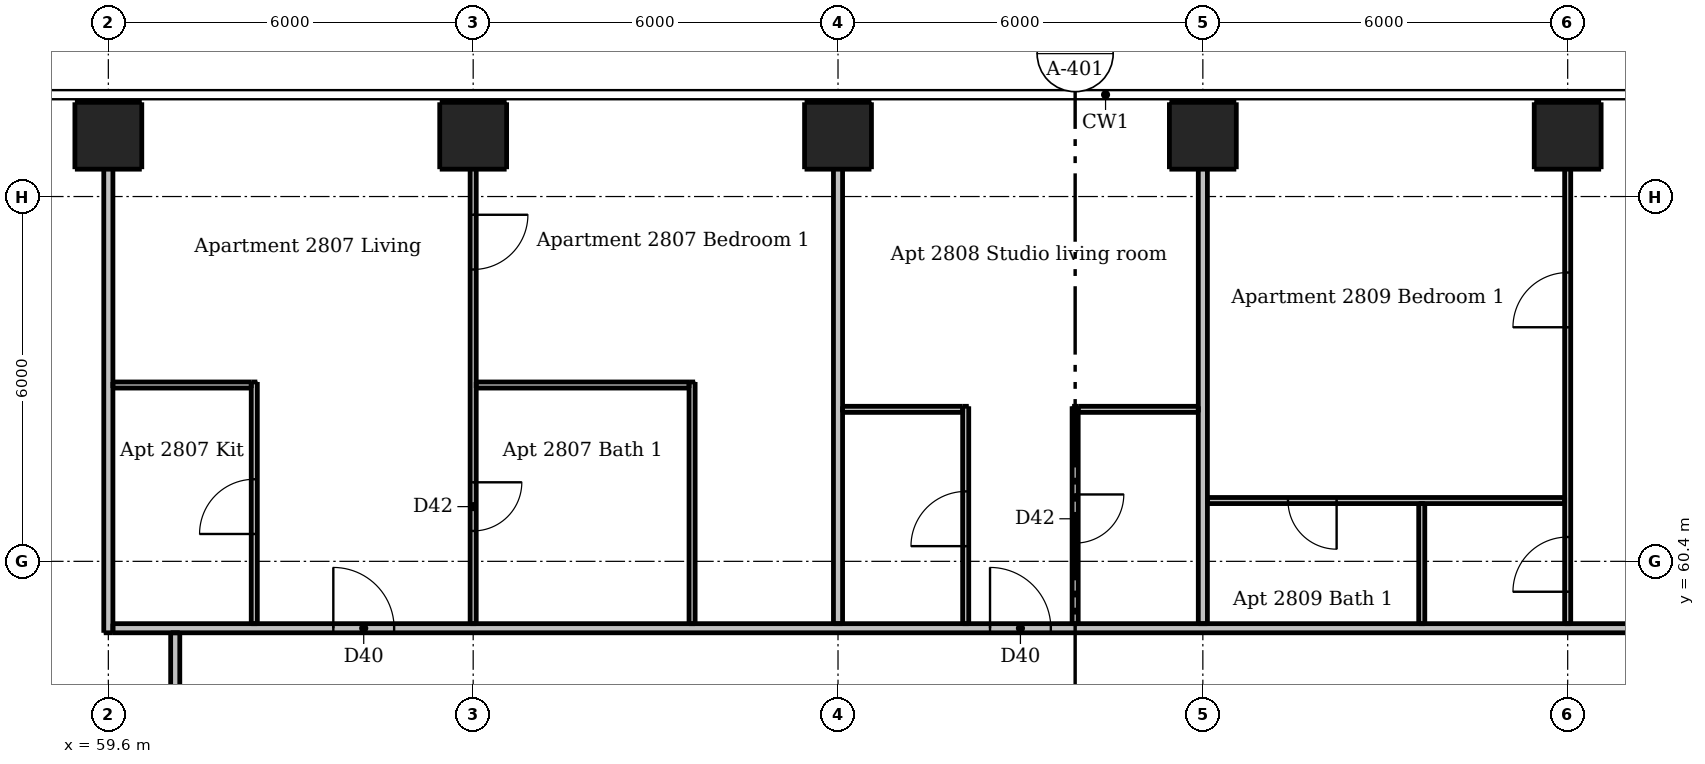
"""IFC4 building model, lengths in metres.
Left out: names, types, materials, properties, quantities, classifications, styles, units other than length and angle.
Written with IfcOpenShell. Run it as: python <this file> out.ifc"""

import sys

from ifc_helpers import new_model, si_unit, direction, frame, frame_2d, origin, origin_2d, place, context, subcontext, project, spatial, rectangle, extrude, element, fill, save


model = new_model("IFC4")
c1 = context("Model", 3, precision=1e-05, world=origin(), true_north=direction((0.0, 1.0)))
c2 = subcontext(c1, "Body", "Model", "MODEL_VIEW")
j1 = project(units=[si_unit("LENGTHUNIT", "METRE"), si_unit("PLANEANGLEUNIT", "RADIAN")], contexts=[c1])
p1 = place(None, origin())
s1 = spatial("IfcSite", under=j1, at=p1, CompositionType="ELEMENT")
p2 = place(p1, origin())
s2 = spatial("IfcBuilding", under=s1, at=p2, CompositionType="ELEMENT")
p3 = place(p2, frame((0.0, 0.0, 105.1)))
s3 = spatial("IfcBuildingStorey", under=s2, at=p3, CompositionType="ELEMENT", Elevation=105.1)
for number, where, z_axis, x_axis in (
    (1, (59.6, 67.4, 0.0), (0.0, 0.0, 1.0), (1.0, 0.0, 0.0)),
    (2, (65.6, 67.4, 0.0), (0.0, 0.0, 1.0), (1.0, 0.0, 0.0)),
    (3, (71.6, 67.4, 0.0), (0.0, 0.0, 1.0), (1.0, 0.0, 0.0)),
    (4, (77.6, 67.4, 0.0), (0.0, 0.0, 1.0), (1.0, 0.0, 0.0)),
    (5, (83.6, 67.4, 0.0), (0.0, 0.0, 1.0), (1.0, 0.0, 0.0)),
):
    element("IfcColumn", number, at=place(p3, frame(where, z_axis=z_axis, x_axis=x_axis)), inside=s3, PredefinedType="COLUMN", context=c2, shape_type="SweptSolid", body=[
        extrude(rectangle(XDim=1.1, YDim=1.1, at=origin_2d()), origin(), (0.0, 0.0, 1.0), 3.05),
    ])
p4 = place(p3, frame((62.0, 59.375, 0.0), z_axis=(0.0, 0.0, 1.0), x_axis=(0.0, 1.0, 0.0)))
e6 = element("IfcWall", 6, at=p4, inside=s3, PredefinedType="PARTITIONING", context=c2, shape_type="SweptSolid", body=[
    extrude(rectangle(XDim=3.975, YDim=0.1, at=frame_2d((1.988, 0.0))), origin(), (0.0, 0.0, 1.0), 3.05),
])
p5 = place(p4, frame((1.475, 0.0, 0.0)))
e7 = element("IfcOpeningElement", 7, at=p5, cuts=e6, PredefinedType="OPENING", context=c2, shape_type="SweptSolid", body=[
    extrude(rectangle(XDim=0.9, YDim=2.1, at=frame_2d((0.45, 1.05))), frame((0.0, 0.06, 0.0), z_axis=(0.0, -1.0, 0.0), x_axis=(1.0, 0.0, 0.0)), (0.0, 0.0, 1.0), 0.12),
])
p6 = place(p3, frame((65.6, 68.0, 0.0), z_axis=(0.0, 0.0, 1.0), x_axis=(0.0, -1.0, 0.0)))
e8 = element("IfcWall", 8, at=p6, inside=s3, PredefinedType="PARTITIONING", context=c2, shape_type="SweptSolid", body=[
    extrude(rectangle(XDim=8.625, YDim=0.1, at=frame_2d((4.312, 0.0))), origin(), (0.0, 0.0, 1.0), 2.516),
])
p7 = place(p6, frame((1.9, 0.0, 0.0)))
e9 = element("IfcOpeningElement", 9, at=p7, cuts=e8, PredefinedType="OPENING", context=c2, shape_type="SweptSolid", body=[
    extrude(rectangle(XDim=0.9, YDim=2.1, at=frame_2d((0.45, 1.05))), frame((0.0, 0.06, 0.0), z_axis=(0.0, -1.0, 0.0), x_axis=(1.0, 0.0, 0.0)), (0.0, 0.0, 1.0), 0.12),
])
p8 = place(p6, frame((6.3, 0.0, 0.0)))
e10 = element("IfcOpeningElement", 10, at=p8, cuts=e8, PredefinedType="OPENING", context=c2, shape_type="SweptSolid", body=[
    extrude(rectangle(XDim=0.8, YDim=2.1, at=frame_2d((0.4, 1.05))), frame((0.0, 0.06, 0.0), z_axis=(0.0, -1.0, 0.0), x_axis=(1.0, 0.0, 0.0)), (0.0, 0.0, 1.0), 0.12),
])
p9 = place(p3, frame((69.2, 59.375, 0.0), z_axis=(0.0, 0.0, 1.0), x_axis=(0.0, 1.0, 0.0)))
e11 = element("IfcWall", 11, at=p9, inside=s3, PredefinedType="PARTITIONING", context=c2, shape_type="SweptSolid", body=[
    extrude(rectangle(XDim=3.975, YDim=0.1, at=frame_2d((1.988, 0.0))), origin(), (0.0, 0.0, 1.0), 3.05),
])
p10 = place(p3, frame((73.7, 59.375, 0.0), z_axis=(0.0, 0.0, 1.0), x_axis=(0.0, 1.0, 0.0)))
e12 = element("IfcWall", 12, at=p10, inside=s3, PredefinedType="PARTITIONING", context=c2, shape_type="SweptSolid", body=[
    extrude(rectangle(XDim=3.575, YDim=0.1, at=frame_2d((1.788, 0.0))), origin(), (0.0, 0.0, 1.0), 3.05),
])
p11 = place(p10, frame((1.275, 0.0, 0.0)))
e13 = element("IfcOpeningElement", 13, at=p11, cuts=e12, PredefinedType="OPENING", context=c2, shape_type="SweptSolid", body=[
    extrude(rectangle(XDim=0.9, YDim=2.1, at=frame_2d((0.45, 1.05))), frame((0.0, 0.06, 0.0), z_axis=(0.0, -1.0, 0.0), x_axis=(1.0, 0.0, 0.0)), (0.0, 0.0, 1.0), 0.12),
])
p12 = place(p3, frame((75.5, 62.95, 0.0), z_axis=(0.0, 0.0, 1.0), x_axis=(0.0, -1.0, 0.0)))
e14 = element("IfcWall", 14, at=p12, inside=s3, PredefinedType="PARTITIONING", context=c2, shape_type="SweptSolid", body=[
    extrude(rectangle(XDim=3.575, YDim=0.1, at=frame_2d((1.788, 0.0))), origin(), (0.0, 0.0, 1.0), 3.05),
])
p13 = place(p12, frame((1.45, 0.0, 0.0)))
e15 = element("IfcOpeningElement", 15, at=p13, cuts=e14, PredefinedType="OPENING", context=c2, shape_type="SweptSolid", body=[
    extrude(rectangle(XDim=0.8, YDim=2.1, at=frame_2d((0.4, 1.05))), frame((0.0, 0.06, 0.0), z_axis=(0.0, -1.0, 0.0), x_axis=(1.0, 0.0, 0.0)), (0.0, 0.0, 1.0), 0.12),
])
p14 = place(p3, frame((81.2, 59.375, 0.0), z_axis=(0.0, 0.0, 1.0), x_axis=(0.0, 1.0, 0.0)))
e16 = element("IfcWall", 16, at=p14, inside=s3, PredefinedType="PARTITIONING", context=c2, shape_type="SweptSolid", body=[
    extrude(rectangle(XDim=1.975, YDim=0.1, at=frame_2d((0.988, 0.0))), origin(), (0.0, 0.0, 1.0), 3.05),
])
p15 = place(p3, frame((83.6, 59.375, 0.0), z_axis=(0.0, 0.0, 1.0), x_axis=(0.0, 1.0, 0.0)))
e17 = element("IfcWall", 17, at=p15, inside=s3, PredefinedType="PARTITIONING", context=c2, shape_type="SweptSolid", body=[
    extrude(rectangle(XDim=8.625, YDim=0.1, at=frame_2d((4.312, 0.0))), origin(), (0.0, 0.0, 1.0), 2.516),
])
p16 = place(p15, frame((0.525, 0.0, 0.0)))
e18 = element("IfcOpeningElement", 18, at=p16, cuts=e17, PredefinedType="OPENING", context=c2, shape_type="SweptSolid", body=[
    extrude(rectangle(XDim=0.9, YDim=2.1, at=frame_2d((0.45, 1.05))), frame((0.0, 0.06, 0.0), z_axis=(0.0, -1.0, 0.0), x_axis=(1.0, 0.0, 0.0)), (0.0, 0.0, 1.0), 0.12),
])
p17 = place(p15, frame((4.875, 0.0, 0.0)))
e19 = element("IfcOpeningElement", 19, at=p17, cuts=e17, PredefinedType="OPENING", context=c2, shape_type="SweptSolid", body=[
    extrude(rectangle(XDim=0.9, YDim=2.1, at=frame_2d((0.45, 1.05))), frame((0.0, 0.06, 0.0), z_axis=(0.0, -1.0, 0.0), x_axis=(1.0, 0.0, 0.0)), (0.0, 0.0, 1.0), 0.12),
])
p18 = place(p3, frame((59.675, 63.3, 0.0), z_axis=(0.0, 0.0, 1.0), x_axis=(1.0, 0.0, 0.0)))
e20 = element("IfcWall", 20, at=p18, inside=s3, PredefinedType="PARTITIONING", context=c2, shape_type="SweptSolid", body=[
    extrude(rectangle(XDim=2.275, YDim=0.1, at=frame_2d((1.137, 0.0))), origin(), (0.0, 0.0, 1.0), 3.05),
])
p19 = place(p3, frame((65.65, 63.3, 0.0), z_axis=(0.0, 0.0, 1.0), x_axis=(1.0, 0.0, 0.0)))
e21 = element("IfcWall", 21, at=p19, inside=s3, PredefinedType="PARTITIONING", context=c2, shape_type="SweptSolid", body=[
    extrude(rectangle(XDim=3.5, YDim=0.1, at=frame_2d((1.75, 0.0))), origin(), (0.0, 0.0, 1.0), 3.05),
])
for number, where, z_axis, x_axis in (
    (22, (71.675, 62.9, 0.0), (0.0, 0.0, 1.0), (1.0, 0.0, 0.0)),
    (23, (75.55, 62.9, 0.0), (0.0, 0.0, 1.0), (1.0, 0.0, 0.0)),
):
    element("IfcWall", number, at=place(p3, frame(where, z_axis=z_axis, x_axis=x_axis)), inside=s3, PredefinedType="PARTITIONING", context=c2, shape_type="SweptSolid", body=[
        extrude(rectangle(XDim=1.975, YDim=0.1, at=frame_2d((0.987, 0.0))), origin(), (0.0, 0.0, 1.0), 3.05),
    ])
p20 = place(p3, frame((83.55, 61.4, 0.0), z_axis=(0.0, 0.0, 1.0), x_axis=(-1.0, 0.0, 0.0)))
e24 = element("IfcWall", 24, at=p20, inside=s3, PredefinedType="PARTITIONING", context=c2, shape_type="SweptSolid", body=[
    extrude(rectangle(XDim=5.875, YDim=0.1, at=frame_2d((2.938, 0.0))), origin(), (0.0, 0.0, 1.0), 3.05),
])
p21 = place(p20, frame((3.75, 0.0, 0.0)))
e25 = element("IfcOpeningElement", 25, at=p21, cuts=e24, PredefinedType="OPENING", context=c2, shape_type="SweptSolid", body=[
    extrude(rectangle(XDim=0.8, YDim=2.1, at=frame_2d((0.4, 1.05))), frame((0.0, 0.06, 0.0), z_axis=(0.0, -1.0, 0.0), x_axis=(1.0, 0.0, 0.0)), (0.0, 0.0, 1.0), 0.12),
])
p22 = place(p3, frame((59.6, 59.225, 0.0), z_axis=(0.0, 0.0, 1.0), x_axis=(0.0, 1.0, 0.0)))
e26 = element("IfcWall", 26, at=p22, inside=s3, PredefinedType="PARTITIONING", context=c2, shape_type="SweptSolid", body=[
    extrude(rectangle(XDim=8.775, YDim=0.15, at=frame_2d((4.387, 0.0))), origin(), (0.0, 0.0, 1.0), 2.51),
])
p23 = place(p3, frame((60.7, 30.325, 0.0), z_axis=(0.0, 0.0, 1.0), x_axis=(0.0, 1.0, 0.0)))
e27 = element("IfcWall", 27, at=p23, inside=s3, PredefinedType="PARTITIONING", context=c2, shape_type="SweptSolid", body=[
    extrude(rectangle(XDim=28.9, YDim=0.15, at=frame_2d((14.45, 0.0))), origin(), (0.0, 0.0, 1.0), 3.05),
])
p24 = place(p23, frame((2.575, 0.0, 0.0)))
e28 = element("IfcOpeningElement", 28, at=p24, cuts=e27, PredefinedType="OPENING", context=c2, shape_type="SweptSolid", body=[
    extrude(rectangle(XDim=1.0, YDim=2.1, at=frame_2d((0.5, 1.05))), frame((0.0, 0.085, 0.0), z_axis=(0.0, -1.0, 0.0), x_axis=(1.0, 0.0, 0.0)), (0.0, 0.0, 1.0), 0.17),
])
p25 = place(p23, frame((8.575, 0.0, 0.0)))
e29 = element("IfcOpeningElement", 29, at=p25, cuts=e27, PredefinedType="OPENING", context=c2, shape_type="SweptSolid", body=[
    extrude(rectangle(XDim=1.0, YDim=2.1, at=frame_2d((0.5, 1.05))), frame((0.0, 0.085, 0.0), z_axis=(0.0, -1.0, 0.0), x_axis=(1.0, 0.0, 0.0)), (0.0, 0.0, 1.0), 0.17),
])
p26 = place(p23, frame((14.575, 0.0, 0.0)))
e30 = element("IfcOpeningElement", 30, at=p26, cuts=e27, PredefinedType="OPENING", context=c2, shape_type="SweptSolid", body=[
    extrude(rectangle(XDim=1.0, YDim=2.1, at=frame_2d((0.5, 1.05))), frame((0.0, 0.085, 0.0), z_axis=(0.0, -1.0, 0.0), x_axis=(1.0, 0.0, 0.0)), (0.0, 0.0, 1.0), 0.17),
])
p27 = place(p23, frame((26.025, 0.0, 0.0)))
e31 = element("IfcOpeningElement", 31, at=p27, cuts=e27, PredefinedType="OPENING", context=c2, shape_type="SweptSolid", body=[
    extrude(rectangle(XDim=1.0, YDim=2.1, at=frame_2d((0.5, 1.05))), frame((0.0, 0.085, 0.0), z_axis=(0.0, -1.0, 0.0), x_axis=(1.0, 0.0, 0.0)), (0.0, 0.0, 1.0), 0.17),
])
for number, where, z_axis, x_axis in (
    (32, (71.6, 59.375, 0.0), (0.0, 0.0, 1.0), (0.0, 1.0, 0.0)),
    (33, (77.6, 59.375, 0.0), (0.0, 0.0, 1.0), (0.0, 1.0, 0.0)),
):
    element("IfcWall", number, at=place(p3, frame(where, z_axis=z_axis, x_axis=x_axis)), inside=s3, PredefinedType="PARTITIONING", context=c2, shape_type="SweptSolid", body=[
        extrude(rectangle(XDim=8.625, YDim=0.15, at=frame_2d((4.312, 0.0))), origin(), (0.0, 0.0, 1.0), 2.516),
    ])
p28 = place(p3, frame((59.675, 59.3, 0.0), z_axis=(0.0, 0.0, 1.0), x_axis=(1.0, 0.0, 0.0)))
e34 = element("IfcWall", 34, at=p28, inside=s3, PredefinedType="PARTITIONING", context=c2, shape_type="SweptSolid", body=[
    extrude(rectangle(XDim=28.55, YDim=0.15, at=frame_2d((14.275, 0.0))), origin(), (0.0, 0.0, 1.0), 3.05),
])
p29 = place(p28, frame((3.625, 0.0, 0.0)))
e35 = element("IfcOpeningElement", 35, at=p29, cuts=e34, PredefinedType="OPENING", context=c2, shape_type="SweptSolid", body=[
    extrude(rectangle(XDim=1.0, YDim=2.1, at=frame_2d((0.5, 1.05))), frame((0.0, 0.085, 0.0), z_axis=(0.0, -1.0, 0.0), x_axis=(1.0, 0.0, 0.0)), (0.0, 0.0, 1.0), 0.17),
])
p30 = place(p28, frame((14.425, 0.0, 0.0)))
e36 = element("IfcOpeningElement", 36, at=p30, cuts=e34, PredefinedType="OPENING", context=c2, shape_type="SweptSolid", body=[
    extrude(rectangle(XDim=1.0, YDim=2.1, at=frame_2d((0.5, 1.05))), frame((0.0, 0.085, 0.0), z_axis=(0.0, -1.0, 0.0), x_axis=(1.0, 0.0, 0.0)), (0.0, 0.0, 1.0), 0.17),
])
p31 = place(p28, frame((25.775, 0.0, 0.0)))
e37 = element("IfcOpeningElement", 37, at=p31, cuts=e34, PredefinedType="OPENING", context=c2, shape_type="SweptSolid", body=[
    extrude(rectangle(XDim=1.0, YDim=2.1, at=frame_2d((0.5, 1.05))), frame((0.0, 0.085, 0.0), z_axis=(0.0, -1.0, 0.0), x_axis=(1.0, 0.0, 0.0)), (0.0, 0.0, 1.0), 0.17),
])
p32 = place(p29, origin())
e38 = element("IfcDoor", 38, at=p32, inside=s3, OperationType="SINGLE_SWING_LEFT", PredefinedType="DOOR", context=c2, shape_type="SweptSolid", body=[
    extrude(rectangle(XDim=1.0, YDim=2.1, at=frame_2d((0.5, 1.05))), frame((0.0, 0.025, 0.0), z_axis=(0.0, -1.0, 0.0), x_axis=(1.0, 0.0, 0.0)), (0.0, 0.0, 1.0), 0.05),
])
fill(e35, e38)
p33 = place(p5, origin())
e39 = element("IfcDoor", 39, at=p33, inside=s3, OperationType="SINGLE_SWING_LEFT", PredefinedType="DOOR", context=c2, shape_type="SweptSolid", body=[
    extrude(rectangle(XDim=0.9, YDim=2.1, at=frame_2d((0.45, 1.05))), frame((0.0, 0.025, 0.0), z_axis=(0.0, -1.0, 0.0), x_axis=(1.0, 0.0, 0.0)), (0.0, 0.0, 1.0), 0.05),
])
fill(e7, e39)
p34 = place(p7, origin())
e40 = element("IfcDoor", 40, at=p34, inside=s3, OperationType="SINGLE_SWING_LEFT", PredefinedType="DOOR", context=c2, shape_type="SweptSolid", body=[
    extrude(rectangle(XDim=0.9, YDim=2.1, at=frame_2d((0.45, 1.05))), frame((0.0, 0.025, 0.0), z_axis=(0.0, -1.0, 0.0), x_axis=(1.0, 0.0, 0.0)), (0.0, 0.0, 1.0), 0.05),
])
fill(e9, e40)
p35 = place(p8, origin())
e41 = element("IfcDoor", 41, at=p35, inside=s3, OperationType="SINGLE_SWING_LEFT", PredefinedType="DOOR", context=c2, shape_type="SweptSolid", body=[
    extrude(rectangle(XDim=0.8, YDim=2.1, at=frame_2d((0.4, 1.05))), frame((0.0, 0.025, 0.0), z_axis=(0.0, -1.0, 0.0), x_axis=(1.0, 0.0, 0.0)), (0.0, 0.0, 1.0), 0.05),
])
fill(e10, e41)
p36 = place(p30, origin())
e42 = element("IfcDoor", 42, at=p36, inside=s3, OperationType="SINGLE_SWING_LEFT", PredefinedType="DOOR", context=c2, shape_type="SweptSolid", body=[
    extrude(rectangle(XDim=1.0, YDim=2.1, at=frame_2d((0.5, 1.05))), frame((0.0, 0.025, 0.0), z_axis=(0.0, -1.0, 0.0), x_axis=(1.0, 0.0, 0.0)), (0.0, 0.0, 1.0), 0.05),
])
fill(e36, e42)
p37 = place(p11, origin())
e43 = element("IfcDoor", 43, at=p37, inside=s3, OperationType="SINGLE_SWING_LEFT", PredefinedType="DOOR", context=c2, shape_type="SweptSolid", body=[
    extrude(rectangle(XDim=0.9, YDim=2.1, at=frame_2d((0.45, 1.05))), frame((0.0, 0.025, 0.0), z_axis=(0.0, -1.0, 0.0), x_axis=(1.0, 0.0, 0.0)), (0.0, 0.0, 1.0), 0.05),
])
fill(e13, e43)
p38 = place(p13, origin())
e44 = element("IfcDoor", 44, at=p38, inside=s3, OperationType="SINGLE_SWING_LEFT", PredefinedType="DOOR", context=c2, shape_type="SweptSolid", body=[
    extrude(rectangle(XDim=0.8, YDim=2.1, at=frame_2d((0.4, 1.05))), frame((0.0, 0.025, 0.0), z_axis=(0.0, -1.0, 0.0), x_axis=(1.0, 0.0, 0.0)), (0.0, 0.0, 1.0), 0.05),
])
fill(e15, e44)
p39 = place(p16, origin())
e45 = element("IfcDoor", 45, at=p39, inside=s3, OperationType="SINGLE_SWING_LEFT", PredefinedType="DOOR", context=c2, shape_type="SweptSolid", body=[
    extrude(rectangle(XDim=0.9, YDim=2.1, at=frame_2d((0.45, 1.05))), frame((0.0, 0.025, 0.0), z_axis=(0.0, -1.0, 0.0), x_axis=(1.0, 0.0, 0.0)), (0.0, 0.0, 1.0), 0.05),
])
fill(e18, e45)
p40 = place(p17, origin())
e46 = element("IfcDoor", 46, at=p40, inside=s3, OperationType="SINGLE_SWING_LEFT", PredefinedType="DOOR", context=c2, shape_type="SweptSolid", body=[
    extrude(rectangle(XDim=0.9, YDim=2.1, at=frame_2d((0.45, 1.05))), frame((0.0, 0.025, 0.0), z_axis=(0.0, -1.0, 0.0), x_axis=(1.0, 0.0, 0.0)), (0.0, 0.0, 1.0), 0.05),
])
fill(e19, e46)
p41 = place(p21, origin())
e47 = element("IfcDoor", 47, at=p41, inside=s3, OperationType="SINGLE_SWING_LEFT", PredefinedType="DOOR", context=c2, shape_type="SweptSolid", body=[
    extrude(rectangle(XDim=0.8, YDim=2.1, at=frame_2d((0.4, 1.05))), frame((0.0, 0.025, 0.0), z_axis=(0.0, -1.0, 0.0), x_axis=(1.0, 0.0, 0.0)), (0.0, 0.0, 1.0), 0.05),
])
fill(e25, e47)
save(model, sys.argv[1])
